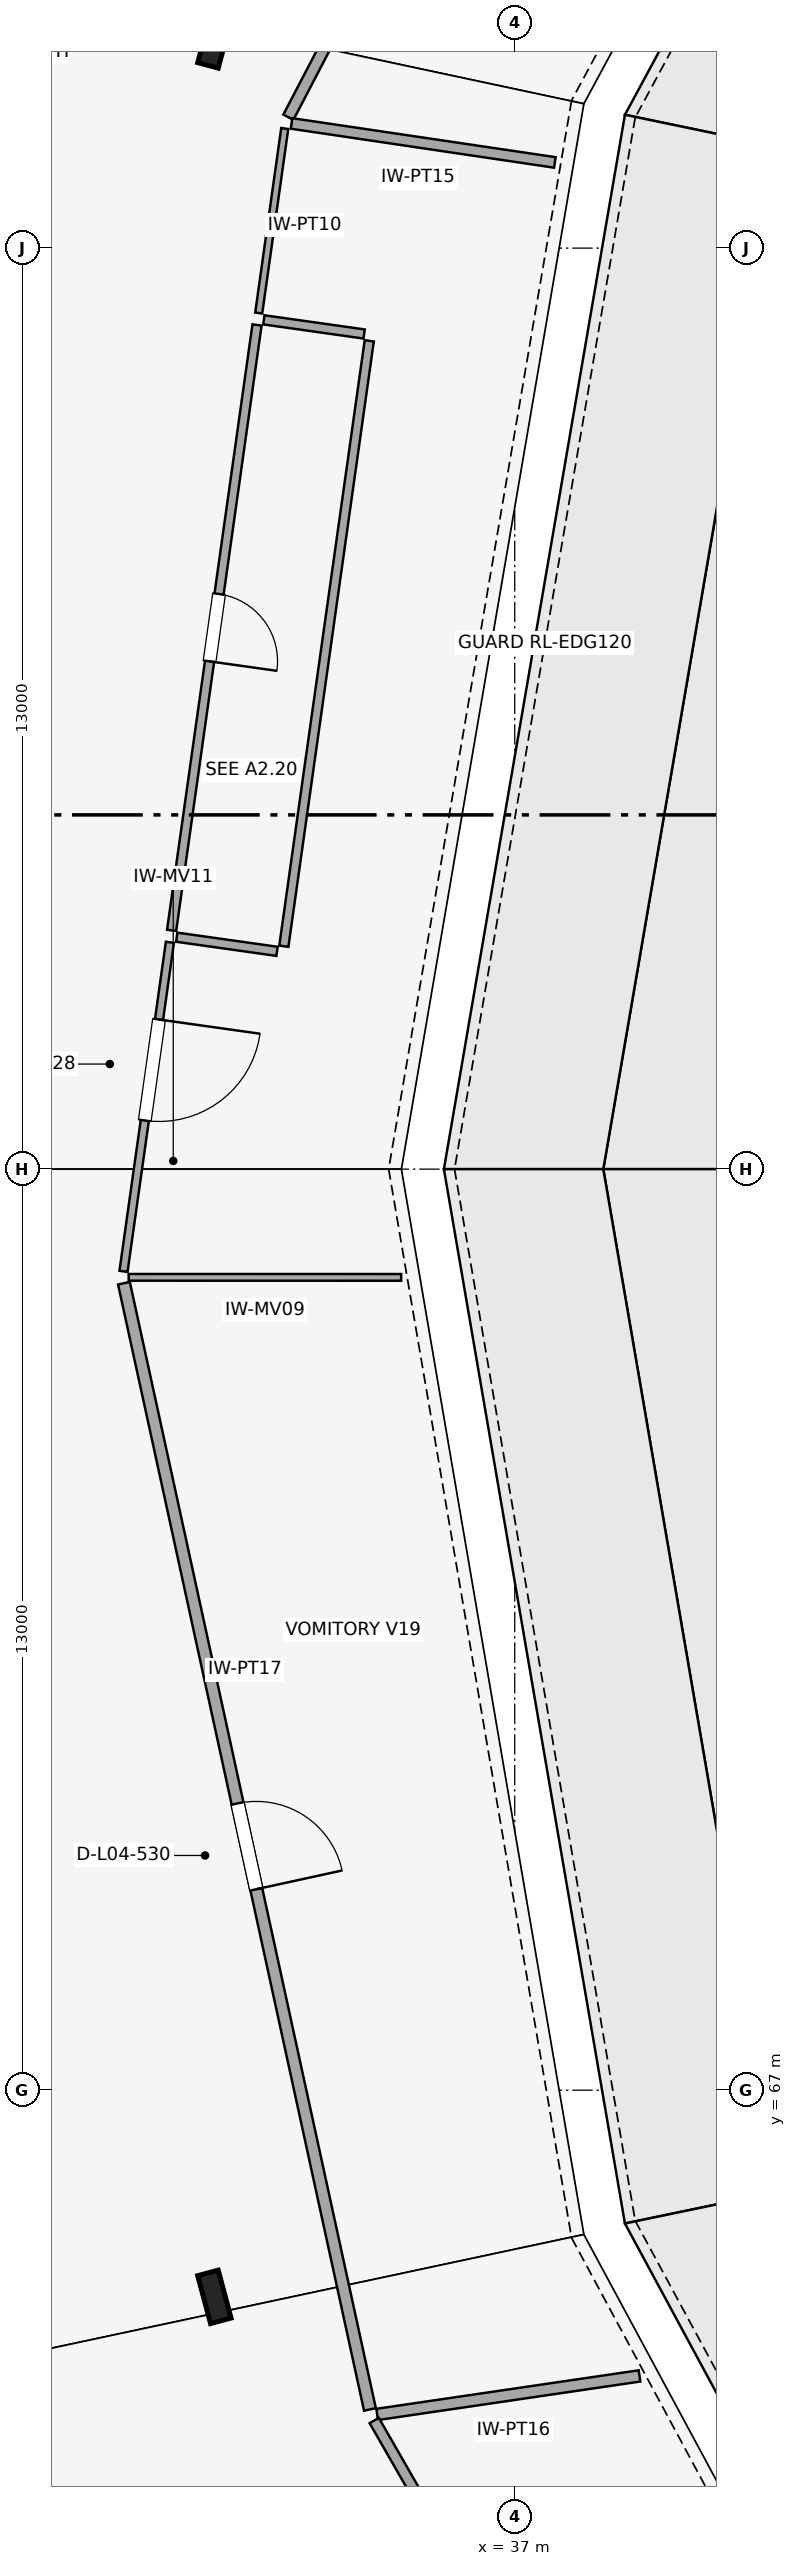
"""IFC4 building model, lengths in metres.
Left out: names, types, materials, properties, quantities, classifications, styles, units other than length and angle.
Written with IfcOpenShell. Run it as: python <this file> out.ifc"""

import sys

from ifc_helpers import new_model, si_unit, direction, frame, frame_2d, origin, origin_2d, place, context, subcontext, project, spatial, rectangle, i_section, extrude, element, fill, save


model = new_model("IFC4")
c1 = context("Model", 3, precision=1e-05, world=origin(), true_north=direction((0.0, 1.0)))
c2 = subcontext(c1, "Body", "Model", "MODEL_VIEW")
j1 = project(units=[si_unit("LENGTHUNIT", "METRE"), si_unit("PLANEANGLEUNIT", "RADIAN")], contexts=[c1])
p1 = place(None, origin())
s1 = spatial("IfcSite", under=j1, at=p1, CompositionType="ELEMENT")
p2 = place(p1, origin())
s2 = spatial("IfcBuilding", under=s1, at=p2, CompositionType="ELEMENT")
p3 = place(p2, frame((0.0, 0.0, 20.8)))
s3 = spatial("IfcBuildingStorey", under=s2, at=p3, CompositionType="ELEMENT", Elevation=20.8)
for number, where, z_axis, x_axis in (
    (1, (32.76, 95.917, 0.0), (0.0, 0.0, 1.0), (-0.966, 0.259, 0.0)),
    (2, (32.76, 64.083, 0.0), (0.0, 0.0, 1.0), (-0.966, -0.259, 0.0)),
):
    element("IfcColumn", number, at=place(p3, frame(where, z_axis=z_axis, x_axis=x_axis)), inside=s3, PredefinedType="COLUMN", context=c2, shape_type="SweptSolid", body=[
        extrude(i_section(OverallWidth=0.3, OverallDepth=0.7, WebThickness=0.017, FlangeThickness=0.032, FilletRadius=0.027, at=origin_2d()), origin(), (0.0, 0.0, 1.0), 5.4),
    ])
p4 = place(p3, frame((40.749, 108.156, 0.0), z_axis=(0.0, 0.0, 1.0), x_axis=(-0.462609914654, -0.886561936282, 0.0)))
e3 = element("IfcWall", 3, at=p4, inside=s3, PredefinedType="PARTITIONING", context=c2, shape_type="SweptSolid", body=[
    extrude(rectangle(XDim=15.012, YDim=0.16, at=frame_2d((7.506, 0.0))), origin(), (0.0, 0.0, 1.0), 3.89),
])
p5 = place(p4, frame((6.926, 0.0, 0.0)))
e4 = element("IfcOpeningElement", 4, at=p5, cuts=e3, PredefinedType="OPENING", context=c2, shape_type="SweptSolid", body=[
    extrude(rectangle(XDim=1.16, YDim=2.38, at=frame_2d((0.58, 1.19))), frame((0.0, 0.09, 0.0), z_axis=(0.0, -1.0, 0.0), x_axis=(1.0, 0.0, 0.0)), (0.0, 0.0, 1.0), 0.18),
])
p6 = place(p3, frame((37.566, 94.209, 0.0), z_axis=(0.0, 0.0, 1.0), x_axis=(-0.989218109101, 0.146449761439, 0.0)))
e5 = element("IfcWall", 5, at=p6, inside=s3, PredefinedType="PARTITIONING", context=c2, shape_type="SweptSolid", body=[
    extrude(rectangle(XDim=3.758, YDim=0.15, at=frame_2d((1.879, 0.0))), origin(), (0.0, 0.0, 1.0), 3.89),
])
p7 = place(p3, frame((33.362, 91.915, 0.0), z_axis=(0.0, 0.0, 1.0), x_axis=(-0.139722077687, -0.990190759908, 0.0)))
e6 = element("IfcWall", 6, at=p7, inside=s3, PredefinedType="PARTITIONING", context=c2, shape_type="SweptSolid", body=[
    extrude(rectangle(XDim=8.63, YDim=0.13, at=frame_2d((4.315, 0.0))), origin(), (0.0, 0.0, 1.0), 3.89),
])
p8 = place(p7, frame((3.835, 0.0, 0.0)))
e7 = element("IfcOpeningElement", 7, at=p8, cuts=e6, PredefinedType="OPENING", context=c2, shape_type="SweptSolid", body=[
    extrude(rectangle(XDim=0.96, YDim=2.24, at=frame_2d((0.48, 1.12))), frame((0.0, 0.075, 0.0), z_axis=(0.0, -1.0, 0.0), x_axis=(1.0, 0.0, 0.0)), (0.0, 0.0, 1.0), 0.15),
])
p9 = place(p3, frame((34.946, 91.692, 0.0), z_axis=(0.0, 0.0, 1.0), x_axis=(-0.139722077687, -0.990190759908, 0.0)))
e8 = element("IfcWall", 8, at=p9, inside=s3, PredefinedType="PARTITIONING", context=c2, shape_type="SweptSolid", body=[
    extrude(rectangle(XDim=8.63, YDim=0.13, at=frame_2d((4.315, 0.0))), origin(), (0.0, 0.0, 1.0), 3.89),
])
p10 = place(p3, frame((33.458, 91.988, 0.0), z_axis=(0.0, 0.0, 1.0), x_axis=(0.990176963496, -0.139819816052, 0.0)))
e9 = element("IfcWall", 9, at=p10, inside=s3, PredefinedType="PARTITIONING", context=c2, shape_type="SweptSolid", body=[
    extrude(rectangle(XDim=1.43, YDim=0.13, at=frame_2d((0.715, 0.0))), origin(), (0.0, 0.0, 1.0), 3.89),
])
p11 = place(p3, frame((32.229, 83.274, 0.0), z_axis=(0.0, 0.0, 1.0), x_axis=(0.990197255053, -0.139676039771, 0.0)))
e10 = element("IfcWall", 10, at=p11, inside=s3, PredefinedType="PARTITIONING", context=c2, shape_type="SweptSolid", body=[
    extrude(rectangle(XDim=1.43, YDim=0.13, at=frame_2d((0.715, 0.0))), origin(), (0.0, 0.0, 1.0), 3.89),
])
p12 = place(p3, frame((33.753, 94.688, 0.0), z_axis=(0.0, 0.0, 1.0), x_axis=(-0.139705688014, -0.990193072454, 0.0)))
e11 = element("IfcWall", 11, at=p12, inside=s3, PredefinedType="PARTITIONING", context=c2, shape_type="SweptSolid", body=[
    extrude(rectangle(XDim=2.63, YDim=0.1, at=frame_2d((1.315, 0.0))), origin(), (0.0, 0.0, 1.0), 3.89),
])
p13 = place(p3, frame((32.132, 83.201, 0.0), z_axis=(0.0, 0.0, 1.0), x_axis=(-0.139708620923, -0.990192658648, 0.0)))
e12 = element("IfcWall", 12, at=p13, inside=s3, PredefinedType="MOVABLE", context=c2, shape_type="SweptSolid", body=[
    extrude(rectangle(XDim=4.69, YDim=0.115, at=frame_2d((2.345, 0.0))), origin(), (0.0, 0.0, 1.0), 3.89),
])
p14 = place(p13, frame((1.1, 0.0, 0.0)))
e13 = element("IfcOpeningElement", 13, at=p14, cuts=e12, PredefinedType="OPENING", context=c2, shape_type="SweptSolid", body=[
    extrude(rectangle(XDim=1.44, YDim=2.24, at=frame_2d((0.72, 1.12))), frame((0.0, 0.067, 0.0), z_axis=(0.0, -1.0, 0.0), x_axis=(1.0, 0.0, 0.0)), (0.0, 0.0, 1.0), 0.135),
])
p15 = place(p3, frame((35.396, 78.472, 0.0), z_axis=(0.0, 0.0, 1.0), x_axis=(-0.999999981869, 0.000190427824, 0.0)))
e14 = element("IfcWall", 14, at=p15, inside=s3, PredefinedType="MOVABLE", context=c2, shape_type="SweptSolid", body=[
    extrude(rectangle(XDim=3.846, YDim=0.095, at=frame_2d((1.923, 0.0))), origin(), (0.0, 0.0, 1.0), 3.89),
])
p16 = place(p3, frame((31.483, 78.39, 0.0), z_axis=(0.0, 0.0, 1.0), x_axis=(0.213413163149, -0.976962037028, 0.0)))
e15 = element("IfcWall", 15, at=p16, inside=s3, PredefinedType="PARTITIONING", context=c2, shape_type="SweptSolid", body=[
    extrude(rectangle(XDim=16.271, YDim=0.17, at=frame_2d((8.135, 0.0))), origin(), (0.0, 0.0, 1.0), 3.89),
])
p17 = place(p16, frame((7.515, 0.0, 0.0)))
e16 = element("IfcOpeningElement", 16, at=p17, cuts=e15, PredefinedType="OPENING", context=c2, shape_type="SweptSolid", body=[
    extrude(rectangle(XDim=1.24, YDim=2.1, at=frame_2d((0.62, 1.05))), frame((0.0, 0.095, 0.0), z_axis=(0.0, -1.0, 0.0), x_axis=(1.0, 0.0, 0.0)), (0.0, 0.0, 1.0), 0.19),
])
p18 = place(p3, frame((38.761, 62.967, 0.0), z_axis=(0.0, 0.0, 1.0), x_axis=(-0.98939280034, -0.145264884385, 0.0)))
e17 = element("IfcWall", 17, at=p18, inside=s3, PredefinedType="PARTITIONING", context=c2, shape_type="SweptSolid", body=[
    extrude(rectangle(XDim=3.743, YDim=0.16, at=frame_2d((1.872, 0.0))), origin(), (0.0, 0.0, 1.0), 3.89),
])
p19 = place(p3, frame((35.016, 62.337, 0.0), z_axis=(0.0, 0.0, 1.0), x_axis=(0.498023782577, -0.867163370991, 0.0)))
e18 = element("IfcWall", 18, at=p19, inside=s3, PredefinedType="PARTITIONING", context=c2, shape_type="SweptSolid", body=[
    extrude(rectangle(XDim=15.363, YDim=0.15, at=frame_2d((7.681, 0.0))), origin(), (0.0, 0.0, 1.0), 3.89),
])
p20 = place(p19, frame((7.061, 0.0, 0.0)))
e19 = element("IfcOpeningElement", 19, at=p20, cuts=e18, PredefinedType="OPENING", context=c2, shape_type="SweptSolid", body=[
    extrude(rectangle(XDim=1.24, YDim=2.38, at=frame_2d((0.62, 1.19))), frame((0.0, 0.085, 0.0), z_axis=(0.0, -1.0, 0.0), x_axis=(1.0, 0.0, 0.0)), (0.0, 0.0, 1.0), 0.17),
])
p21 = place(p8, origin())
e20 = element("IfcDoor", 20, at=p21, inside=s3, OperationType="SINGLE_SWING_RIGHT", PredefinedType="DOOR", context=c2, shape_type="SweptSolid", body=[
    extrude(rectangle(XDim=0.96, YDim=2.24, at=frame_2d((0.48, 1.12))), frame((0.0, 0.025, 0.0), z_axis=(0.0, -1.0, 0.0), x_axis=(1.0, 0.0, 0.0)), (0.0, 0.0, 1.0), 0.05),
])
fill(e7, e20)
p22 = place(p14, origin())
e21 = element("IfcDoor", 21, at=p22, inside=s3, OperationType="SINGLE_SWING_LEFT", PredefinedType="DOOR", context=c2, shape_type="SweptSolid", body=[
    extrude(rectangle(XDim=1.44, YDim=2.24, at=frame_2d((0.72, 1.12))), frame((0.0, 0.025, 0.0), z_axis=(0.0, -1.0, 0.0), x_axis=(1.0, 0.0, 0.0)), (0.0, 0.0, 1.0), 0.05),
])
fill(e13, e21)
p23 = place(p17, origin())
e22 = element("IfcDoor", 22, at=p23, inside=s3, OperationType="SINGLE_SWING_RIGHT", PredefinedType="DOOR", context=c2, shape_type="SweptSolid", body=[
    extrude(rectangle(XDim=1.24, YDim=2.1, at=frame_2d((0.62, 1.05))), frame((0.0, 0.025, 0.0), z_axis=(0.0, -1.0, 0.0), x_axis=(1.0, 0.0, 0.0)), (0.0, 0.0, 1.0), 0.05),
])
fill(e16, e22)
save(model, sys.argv[1])
